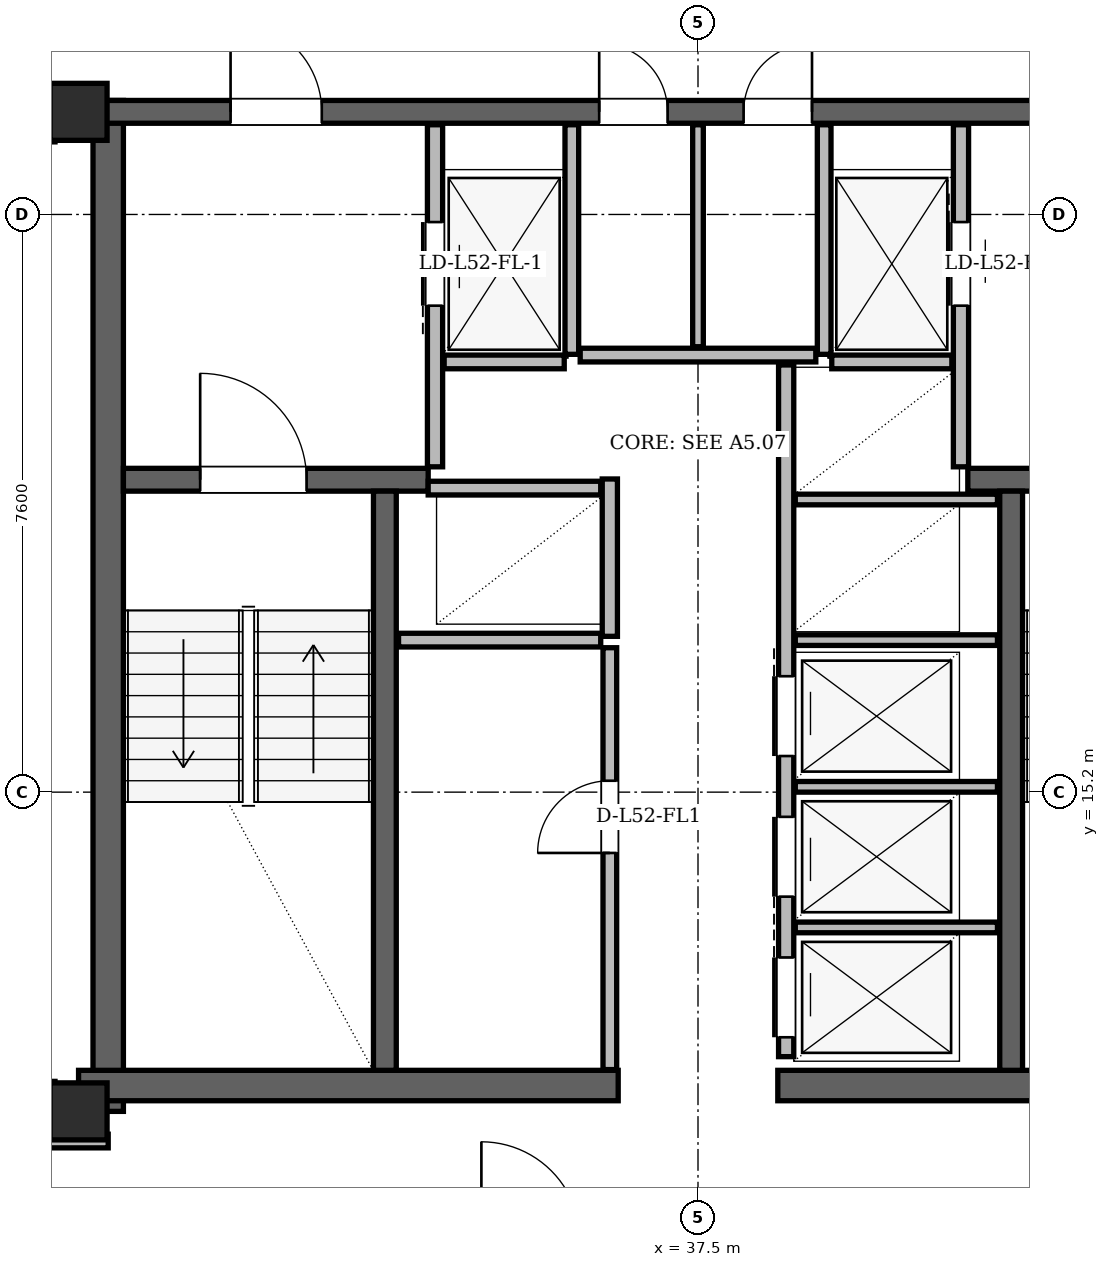
"""IFC4 building model, lengths in metres.
Left out: names, types, materials, properties, quantities, classifications, styles, units other than length and angle.
Written with IfcOpenShell. Run it as: python <this file> out.ifc"""

import sys

from ifc_helpers import new_model, si_unit, direction, frame, frame_2d, origin, origin_2d, place, context, subcontext, project, spatial, rectangle, hollow_rectangle, extrude, element, fill, save


model = new_model("IFC4")
c1 = context("Model", 3, precision=1e-05, world=origin(), true_north=direction((0.0, 1.0)))
c2 = subcontext(c1, "Body", "Model", "MODEL_VIEW")
j1 = project(units=[si_unit("LENGTHUNIT", "METRE"), si_unit("PLANEANGLEUNIT", "RADIAN")], contexts=[c1])
p1 = place(None, origin())
s1 = spatial("IfcSite", under=j1, at=p1, CompositionType="ELEMENT")
p2 = place(p1, origin())
s2 = spatial("IfcBuilding", under=s1, at=p2, CompositionType="ELEMENT")
p3 = place(p2, frame((0.0, 0.0, 197.4)))
s3 = spatial("IfcBuildingStorey", under=s2, at=p3, CompositionType="ELEMENT", Elevation=197.4)
for number, where, z_axis, x_axis in (
    (1, (29.35, 11.0, 0.0), (0.0, 0.0, 1.0), (1.0, 0.0, 0.0)),
    (2, (29.35, 24.15, 0.0), (0.0, 0.0, 1.0), (1.0, 0.0, 0.0)),
):
    element("IfcColumn", number, at=place(p3, frame(where, z_axis=z_axis, x_axis=x_axis)), inside=s3, PredefinedType="COLUMN", context=c2, shape_type="SweptSolid", body=[
        extrude(hollow_rectangle(XDim=0.75, YDim=0.75, WallThickness=0.06, at=origin_2d()), origin(), (0.0, 0.0, 1.0), 3.6),
    ])
p4 = place(p3, frame((29.74, 11.0, 0.0), z_axis=(0.0, 0.0, 1.0), x_axis=(0.0, 1.0, 0.0)))
e3 = element("IfcWall", 3, at=p4, inside=s3, PredefinedType="SHEAR", context=c2, shape_type="SweptSolid", body=[
    extrude(rectangle(XDim=13.3, YDim=0.4, at=frame_2d((6.65, 0.0))), origin(), (0.0, 0.0, 1.0), 3.38),
])
for number, where, z_axis, x_axis in (
    (4, (29.35, 11.34, 0.0), (0.0, 0.0, 1.0), (1.0, 0.0, 0.0)),
    (5, (38.55, 11.34, 0.0), (0.0, 0.0, 1.0), (1.0, 0.0, 0.0)),
):
    element("IfcWall", number, at=place(p3, frame(where, z_axis=z_axis, x_axis=x_axis)), inside=s3, PredefinedType="SHEAR", context=c2, shape_type="SweptSolid", body=[
        extrude(rectangle(XDim=7.1, YDim=0.4, at=frame_2d((3.55, 0.0))), origin(), (0.0, 0.0, 1.0), 3.38),
    ])
p5 = place(p3, frame((29.65, 24.15, 0.0), z_axis=(0.0, 0.0, 1.0), x_axis=(1.0, 0.0, 0.0)))
e6 = element("IfcWall", 6, at=p5, inside=s3, PredefinedType="SHEAR", context=c2, shape_type="SweptSolid", body=[
    extrude(rectangle(XDim=15.7, YDim=0.3, at=frame_2d((7.85, 0.0))), origin(), (0.0, 0.0, 1.0), 3.38),
])
p6 = place(p5, frame((1.7, 0.0, 0.0)))
e7 = element("IfcOpeningElement", 7, at=p6, cuts=e6, PredefinedType="OPENING", context=c2, shape_type="SweptSolid", body=[
    extrude(rectangle(XDim=1.2, YDim=2.2, at=frame_2d((0.6, 1.1))), frame((0.0, 0.15, 0.0), z_axis=(0.0, -1.0, 0.0), x_axis=(1.0, 0.0, 0.0)), (0.0, 0.0, 1.0), 0.3),
])
p7 = place(p5, frame((12.8, 0.0, 0.0)))
e8 = element("IfcOpeningElement", 8, at=p7, cuts=e6, PredefinedType="OPENING", context=c2, shape_type="SweptSolid", body=[
    extrude(rectangle(XDim=1.2, YDim=2.2, at=frame_2d((0.6, 1.1))), frame((0.0, 0.15, 0.0), z_axis=(0.0, -1.0, 0.0), x_axis=(1.0, 0.0, 0.0)), (0.0, 0.0, 1.0), 0.3),
])
p8 = place(p5, frame((6.55, 0.0, 0.0)))
e9 = element("IfcOpeningElement", 9, at=p8, cuts=e6, PredefinedType="OPENING", context=c2, shape_type="SweptSolid", body=[
    extrude(rectangle(XDim=0.9, YDim=2.05, at=frame_2d((0.45, 1.025))), frame((0.0, 0.15, 0.0), z_axis=(0.0, -1.0, 0.0), x_axis=(1.0, 0.0, 0.0)), (0.0, 0.0, 1.0), 0.3),
])
p9 = place(p5, frame((8.45, 0.0, 0.0)))
e10 = element("IfcOpeningElement", 10, at=p9, cuts=e6, PredefinedType="OPENING", context=c2, shape_type="SweptSolid", body=[
    extrude(rectangle(XDim=0.9, YDim=2.05, at=frame_2d((0.45, 1.025))), frame((0.0, 0.15, 0.0), z_axis=(0.0, -1.0, 0.0), x_axis=(1.0, 0.0, 0.0)), (0.0, 0.0, 1.0), 0.3),
])
p10 = place(p3, frame((29.94, 19.31, 0.0), z_axis=(0.0, 0.0, 1.0), x_axis=(1.0, 0.0, 0.0)))
e11 = element("IfcWall", 11, at=p10, inside=s3, PredefinedType="SHEAR", context=c2, shape_type="SweptSolid", body=[
    extrude(rectangle(XDim=4.01, YDim=0.3, at=frame_2d((2.005, 0.0))), origin(), (0.0, 0.0, 1.0), 3.38),
])
p11 = place(p10, frame((1.01, 0.0, 0.0)))
e12 = element("IfcOpeningElement", 12, at=p11, cuts=e11, PredefinedType="OPENING", context=c2, shape_type="SweptSolid", body=[
    extrude(rectangle(XDim=1.4, YDim=2.2, at=frame_2d((0.7, 1.1))), frame((0.0, 0.15, 0.0), z_axis=(0.0, -1.0, 0.0), x_axis=(1.0, 0.0, 0.0)), (0.0, 0.0, 1.0), 0.3),
])
p12 = place(p3, frame((41.05, 19.31, 0.0), z_axis=(0.0, 0.0, 1.0), x_axis=(1.0, 0.0, 0.0)))
e13 = element("IfcWall", 13, at=p12, inside=s3, PredefinedType="SHEAR", context=c2, shape_type="SweptSolid", body=[
    extrude(rectangle(XDim=4.01, YDim=0.3, at=frame_2d((2.005, 0.0))), origin(), (0.0, 0.0, 1.0), 3.38),
])
p13 = place(p12, frame((1.6, 0.0, 0.0)))
e14 = element("IfcOpeningElement", 14, at=p13, cuts=e13, PredefinedType="OPENING", context=c2, shape_type="SweptSolid", body=[
    extrude(rectangle(XDim=1.4, YDim=2.2, at=frame_2d((0.7, 1.1))), frame((0.0, 0.15, 0.0), z_axis=(0.0, -1.0, 0.0), x_axis=(1.0, 0.0, 0.0)), (0.0, 0.0, 1.0), 0.3),
])
for number, where, z_axis, x_axis in (
    (15, (33.38, 11.54, 0.0), (0.0, 0.0, 1.0), (0.0, 1.0, 0.0)),
    (16, (41.62, 11.54, 0.0), (0.0, 0.0, 1.0), (0.0, 1.0, 0.0)),
):
    element("IfcWall", number, at=place(p3, frame(where, z_axis=z_axis, x_axis=x_axis)), inside=s3, PredefinedType="SHEAR", context=c2, shape_type="SweptSolid", body=[
        extrude(rectangle(XDim=7.62, YDim=0.3, at=frame_2d((3.81, 0.0))), origin(), (0.0, 0.0, 1.0), 3.38),
    ])
p14 = place(p3, frame((33.766, 43.21, 0.0), z_axis=(0.0, 0.0, 1.0), x_axis=(-0.499998847915, -0.86602606894, 0.0)))
e17 = element("IfcWall", 17, at=p14, inside=s3, PredefinedType="SOLIDWALL", context=c2, shape_type="SweptSolid", body=[
    extrude(rectangle(XDim=36.293, YDim=0.29, at=frame_2d((18.147, 0.0))), origin(), (0.0, 0.0, 1.0), 2.677),
])
p15 = place(p14, frame((8.034, 0.0, 0.0)))
e18 = element("IfcOpeningElement", 18, at=p15, cuts=e17, PredefinedType="OPENING", context=c2, shape_type="SweptSolid", body=[
    extrude(rectangle(XDim=1.5, YDim=2.2, at=frame_2d((0.75, 1.1))), frame((0.0, 0.145, 0.0), z_axis=(0.0, -1.0, 0.0), x_axis=(1.0, 0.0, 0.0)), (0.0, 0.0, 1.0), 0.29),
])
p16 = place(p14, frame((28.214, 0.0, 0.0)))
e19 = element("IfcOpeningElement", 19, at=p16, cuts=e17, PredefinedType="OPENING", context=c2, shape_type="SweptSolid", body=[
    extrude(rectangle(XDim=1.5, YDim=2.2, at=frame_2d((0.75, 1.1))), frame((0.0, 0.145, 0.0), z_axis=(0.0, -1.0, 0.0), x_axis=(1.0, 0.0, 0.0)), (0.0, 0.0, 1.0), 0.29),
])
p17 = place(p14, frame((32.772, 0.0, 0.85)))
e20 = element("IfcOpeningElement", 20, at=p17, cuts=e17, PredefinedType="OPENING", context=c2, shape_type="SweptSolid", body=[
    extrude(rectangle(XDim=2.4, YDim=1.717, at=frame_2d((1.2, 0.858))), frame((0.0, 0.145, 0.0), z_axis=(0.0, -1.0, 0.0), x_axis=(1.0, 0.0, 0.0)), (0.0, 0.0, 1.0), 0.29),
])
p18 = place(p14, frame((21.96, 0.0, 0.85)))
e21 = element("IfcOpeningElement", 21, at=p18, cuts=e17, PredefinedType="OPENING", context=c2, shape_type="SweptSolid", body=[
    extrude(rectangle(XDim=2.0, YDim=1.717, at=frame_2d((1.0, 0.858))), frame((0.0, 0.145, 0.0), z_axis=(0.0, -1.0, 0.0), x_axis=(1.0, 0.0, 0.0)), (0.0, 0.0, 1.0), 0.29),
])
p19 = place(p14, frame((2.382, 0.0, 0.85)))
e22 = element("IfcOpeningElement", 22, at=p19, cuts=e17, PredefinedType="OPENING", context=c2, shape_type="SweptSolid", body=[
    extrude(rectangle(XDim=1.6, YDim=1.7, at=frame_2d((0.8, 0.85))), frame((0.0, 0.145, 0.0), z_axis=(0.0, -1.0, 0.0), x_axis=(1.0, 0.0, 0.0)), (0.0, 0.0, 1.0), 0.29),
])
p20 = place(p14, frame((13.34, 0.0, 0.85)))
e23 = element("IfcOpeningElement", 23, at=p20, cuts=e17, PredefinedType="OPENING", context=c2, shape_type="SweptSolid", body=[
    extrude(rectangle(XDim=3.0, YDim=1.717, at=frame_2d((1.5, 0.858))), frame((0.0, 0.145, 0.0), z_axis=(0.0, -1.0, 0.0), x_axis=(1.0, 0.0, 0.0)), (0.0, 0.0, 1.0), 0.29),
])
p21 = place(p3, frame((34.04, 19.48, 0.0), z_axis=(0.0, 0.0, 1.0), x_axis=(0.0, 1.0, 0.0)))
e24 = element("IfcWall", 24, at=p21, inside=s3, PredefinedType="PARTITIONING", context=c2, shape_type="SweptSolid", body=[
    extrude(rectangle(XDim=4.5, YDim=0.2, at=frame_2d((2.25, 0.0))), origin(), (0.0, 0.0, 1.0), 3.38),
])
p22 = place(p21, frame((2.12, 0.0, 0.0)))
e25 = element("IfcOpeningElement", 25, at=p22, cuts=e24, PredefinedType="OPENING", context=c2, shape_type="SweptSolid", body=[
    extrude(rectangle(XDim=1.1, YDim=2.2, at=frame_2d((0.55, 1.1))), frame((0.0, 0.1, 0.0), z_axis=(0.0, -1.0, 0.0), x_axis=(1.0, 0.0, 0.0)), (0.0, 0.0, 1.0), 0.2),
])
p23 = place(p3, frame((35.84, 20.96, 0.0), z_axis=(0.0, 0.0, 1.0), x_axis=(0.0, 1.0, 0.0)))
e26 = element("IfcWall", 26, at=p23, inside=s3, PredefinedType="PARTITIONING", context=c2, shape_type="SweptSolid", body=[
    extrude(rectangle(XDim=3.02, YDim=0.18, at=frame_2d((1.51, 0.0))), origin(), (0.0, 0.0, 1.0), 3.38),
])
p24 = place(p3, frame((34.16, 20.86, 0.0), z_axis=(0.0, 0.0, 1.0), x_axis=(1.0, 0.0, 0.0)))
e27 = element("IfcWall", 27, at=p24, inside=s3, PredefinedType="PARTITIONING", context=c2, shape_type="SweptSolid", body=[
    extrude(rectangle(XDim=1.58, YDim=0.18, at=frame_2d((0.79, 0.0))), origin(), (0.0, 0.0, 1.0), 3.38),
])
p25 = place(p3, frame((40.96, 19.48, 0.0), z_axis=(0.0, 0.0, 1.0), x_axis=(0.0, 1.0, 0.0)))
e28 = element("IfcWall", 28, at=p25, inside=s3, PredefinedType="PARTITIONING", context=c2, shape_type="SweptSolid", body=[
    extrude(rectangle(XDim=4.5, YDim=0.2, at=frame_2d((2.25, 0.0))), origin(), (0.0, 0.0, 1.0), 3.38),
])
p26 = place(p25, frame((2.12, 0.0, 0.0)))
e29 = element("IfcOpeningElement", 29, at=p26, cuts=e28, PredefinedType="OPENING", context=c2, shape_type="SweptSolid", body=[
    extrude(rectangle(XDim=1.1, YDim=2.2, at=frame_2d((0.55, 1.1))), frame((0.0, 0.1, 0.0), z_axis=(0.0, -1.0, 0.0), x_axis=(1.0, 0.0, 0.0)), (0.0, 0.0, 1.0), 0.2),
])
p27 = place(p3, frame((39.16, 20.96, 0.0), z_axis=(0.0, 0.0, 1.0), x_axis=(0.0, 1.0, 0.0)))
e30 = element("IfcWall", 30, at=p27, inside=s3, PredefinedType="PARTITIONING", context=c2, shape_type="SweptSolid", body=[
    extrude(rectangle(XDim=3.02, YDim=0.18, at=frame_2d((1.51, 0.0))), origin(), (0.0, 0.0, 1.0), 3.38),
])
p28 = place(p3, frame((39.26, 20.86, 0.0), z_axis=(0.0, 0.0, 1.0), x_axis=(1.0, 0.0, 0.0)))
e31 = element("IfcWall", 31, at=p28, inside=s3, PredefinedType="PARTITIONING", context=c2, shape_type="SweptSolid", body=[
    extrude(rectangle(XDim=1.58, YDim=0.18, at=frame_2d((0.79, 0.0))), origin(), (0.0, 0.0, 1.0), 3.38),
])
p29 = place(p3, frame((36.34, 17.25, 0.0), z_axis=(0.0, 0.0, 1.0), x_axis=(0.0, 1.0, 0.0)))
e32 = element("IfcWall", 32, at=p29, inside=s3, PredefinedType="PARTITIONING", context=c2, shape_type="SweptSolid", body=[
    extrude(rectangle(XDim=2.07, YDim=0.2, at=frame_2d((1.035, 0.0))), origin(), (0.0, 0.0, 1.0), 3.38),
])
p30 = place(p3, frame((33.95, 19.2, 0.0), z_axis=(0.0, 0.0, 1.0), x_axis=(1.0, 0.0, 0.0)))
e33 = element("IfcWall", 33, at=p30, inside=s3, PredefinedType="PARTITIONING", context=c2, shape_type="SweptSolid", body=[
    extrude(rectangle(XDim=2.27, YDim=0.18, at=frame_2d((1.135, 0.0))), origin(), (0.0, 0.0, 1.0), 3.38),
])
p31 = place(p3, frame((33.56, 17.2, 0.0), z_axis=(0.0, 0.0, 1.0), x_axis=(1.0, 0.0, 0.0)))
e34 = element("IfcWall", 34, at=p31, inside=s3, PredefinedType="PARTITIONING", context=c2, shape_type="SweptSolid", body=[
    extrude(rectangle(XDim=2.66, YDim=0.18, at=frame_2d((1.33, 0.0))), origin(), (0.0, 0.0, 1.0), 3.38),
])
p32 = place(p3, frame((36.34, 11.55, 0.0), z_axis=(0.0, 0.0, 1.0), x_axis=(0.0, 1.0, 0.0)))
e35 = element("IfcWall", 35, at=p32, inside=s3, PredefinedType="PARTITIONING", context=c2, shape_type="SweptSolid", body=[
    extrude(rectangle(XDim=5.55, YDim=0.18, at=frame_2d((2.775, 0.0))), origin(), (0.0, 0.0, 1.0), 3.38),
])
p33 = place(p32, frame((2.85, 0.0, 0.0)))
e36 = element("IfcOpeningElement", 36, at=p33, cuts=e35, PredefinedType="OPENING", context=c2, shape_type="SweptSolid", body=[
    extrude(rectangle(XDim=0.95, YDim=2.1, at=frame_2d((0.475, 1.05))), frame((0.0, 0.09, 0.0), z_axis=(0.0, -1.0, 0.0), x_axis=(1.0, 0.0, 0.0)), (0.0, 0.0, 1.0), 0.18),
])
p34 = place(p3, frame((38.66, 11.72, 0.0), z_axis=(0.0, 0.0, 1.0), x_axis=(0.0, 1.0, 0.0)))
e37 = element("IfcWall", 37, at=p34, inside=s3, PredefinedType="PARTITIONING", context=c2, shape_type="SweptSolid", body=[
    extrude(rectangle(XDim=9.1, YDim=0.2, at=frame_2d((4.55, 0.0))), origin(), (0.0, 0.0, 1.0), 3.38),
])
p35 = place(p34, frame((0.255, 0.0, 0.0)))
e38 = element("IfcOpeningElement", 38, at=p35, cuts=e37, PredefinedType="OPENING", context=c2, shape_type="SweptSolid", body=[
    extrude(rectangle(XDim=1.05, YDim=2.15, at=frame_2d((0.525, 1.075))), frame((0.0, 0.1, 0.0), z_axis=(0.0, -1.0, 0.0), x_axis=(1.0, 0.0, 0.0)), (0.0, 0.0, 1.0), 0.2),
])
p36 = place(p34, frame((2.105, 0.0, 0.0)))
e39 = element("IfcOpeningElement", 39, at=p36, cuts=e37, PredefinedType="OPENING", context=c2, shape_type="SweptSolid", body=[
    extrude(rectangle(XDim=1.05, YDim=2.15, at=frame_2d((0.525, 1.075))), frame((0.0, 0.1, 0.0), z_axis=(0.0, -1.0, 0.0), x_axis=(1.0, 0.0, 0.0)), (0.0, 0.0, 1.0), 0.2),
])
p37 = place(p34, frame((3.955, 0.0, 0.0)))
e40 = element("IfcOpeningElement", 40, at=p37, cuts=e37, PredefinedType="OPENING", context=c2, shape_type="SweptSolid", body=[
    extrude(rectangle(XDim=1.05, YDim=2.15, at=frame_2d((0.525, 1.075))), frame((0.0, 0.1, 0.0), z_axis=(0.0, -1.0, 0.0), x_axis=(1.0, 0.0, 0.0)), (0.0, 0.0, 1.0), 0.2),
])
for number, where, z_axis, x_axis in (
    (41, (38.78, 13.42, 0.0), (0.0, 0.0, 1.0), (1.0, 0.0, 0.0)),
    (42, (38.78, 15.27, 0.0), (0.0, 0.0, 1.0), (1.0, 0.0, 0.0)),
    (43, (38.78, 17.2, 0.0), (0.0, 0.0, 1.0), (1.0, 0.0, 0.0)),
    (44, (38.78, 19.05, 0.0), (0.0, 0.0, 1.0), (1.0, 0.0, 0.0)),
):
    element("IfcWall", number, at=place(p3, frame(where, z_axis=z_axis, x_axis=x_axis)), inside=s3, PredefinedType="PARTITIONING", context=c2, shape_type="SweptSolid", body=[
        extrude(rectangle(XDim=2.66, YDim=0.14, at=frame_2d((1.33, 0.0))), origin(), (0.0, 0.0, 1.0), 3.38),
    ])
p38 = place(p3, frame((35.95, 20.95, 0.0), z_axis=(0.0, 0.0, 1.0), x_axis=(1.0, 0.0, 0.0)))
e45 = element("IfcWall", 45, at=p38, inside=s3, PredefinedType="PARTITIONING", context=c2, shape_type="SweptSolid", body=[
    extrude(rectangle(XDim=3.1, YDim=0.18, at=frame_2d((1.55, 0.0))), origin(), (0.0, 0.0, 1.0), 3.38),
])
p39 = place(p3, frame((37.5, 21.06, 0.0), z_axis=(0.0, 0.0, 1.0), x_axis=(0.0, 1.0, 0.0)))
e46 = element("IfcWall", 46, at=p39, inside=s3, PredefinedType="PARTITIONING", context=c2, shape_type="SweptSolid", body=[
    extrude(rectangle(XDim=2.92, YDim=0.14, at=frame_2d((1.46, 0.0))), origin(), (0.0, 0.0, 1.0), 3.38),
])
p40 = place(p3, frame((28.96, 10.61, 0.0), z_axis=(0.0, 0.0, 1.0), x_axis=(1.0, 0.0, 0.0)))
e47 = element("IfcWall", 47, at=p40, inside=s3, PredefinedType="PARTITIONING", context=c2, shape_type="SweptSolid", body=[
    extrude(rectangle(XDim=0.78, YDim=0.18, at=frame_2d((0.39, 0.0))), origin(), (0.0, 0.0, 1.0), 3.38),
])
p41 = place(p3, frame((28.95, 10.95, 0.0), z_axis=(0.0, 0.0, 1.0), x_axis=(0.0, 1.0, 0.0)))
e48 = element("IfcWall", 48, at=p41, inside=s3, PredefinedType="PARTITIONING", context=c2, shape_type="SweptSolid", body=[
    extrude(rectangle(XDim=0.445, YDim=0.18, at=frame_2d((0.223, 0.0))), origin(), (0.0, 0.0, 1.0), 2.913),
])
p42 = place(p3, frame((28.95, 23.755, 0.0), z_axis=(0.0, 0.0, 1.0), x_axis=(0.0, 1.0, 0.0)))
e49 = element("IfcWall", 49, at=p42, inside=s3, PredefinedType="PARTITIONING", context=c2, shape_type="SweptSolid", body=[
    extrude(rectangle(XDim=0.565, YDim=0.18, at=frame_2d((0.283, 0.0))), origin(), (0.0, 0.0, 1.0), 3.38),
])
p43 = place(p33, origin())
e50 = element("IfcDoor", 50, at=p43, inside=s3, OperationType="SINGLE_SWING_LEFT", PredefinedType="DOOR", context=c2, shape_type="SweptSolid", body=[
    extrude(rectangle(XDim=0.95, YDim=2.1, at=frame_2d((0.475, 1.05))), frame((0.0, 0.025, 0.0), z_axis=(0.0, -1.0, 0.0), x_axis=(1.0, 0.0, 0.0)), (0.0, 0.0, 1.0), 0.05),
])
fill(e36, e50)
p44 = place(p22, origin())
e51 = element("IfcDoor", 51, at=p44, inside=s3, OperationType="SLIDING_TO_LEFT", PredefinedType="DOOR", context=c2, shape_type="SweptSolid", body=[
    extrude(rectangle(XDim=1.1, YDim=2.2, at=frame_2d((0.55, 1.1))), frame((0.0, 0.025, 0.0), z_axis=(0.0, -1.0, 0.0), x_axis=(1.0, 0.0, 0.0)), (0.0, 0.0, 1.0), 0.05),
])
fill(e25, e51)
p45 = place(p26, origin())
e52 = element("IfcDoor", 52, at=p45, inside=s3, OperationType="SLIDING_TO_RIGHT", PredefinedType="DOOR", context=c2, shape_type="SweptSolid", body=[
    extrude(rectangle(XDim=1.1, YDim=2.2, at=frame_2d((0.55, 1.1))), frame((0.0, 0.025, 0.0), z_axis=(0.0, -1.0, 0.0), x_axis=(1.0, 0.0, 0.0)), (0.0, 0.0, 1.0), 0.05),
])
fill(e29, e52)
p46 = place(p35, origin())
e53 = element("IfcDoor", 53, at=p46, inside=s3, OperationType="SLIDING_TO_RIGHT", PredefinedType="DOOR", context=c2, shape_type="SweptSolid", body=[
    extrude(rectangle(XDim=1.05, YDim=2.15, at=frame_2d((0.525, 1.075))), frame((0.0, 0.025, 0.0), z_axis=(0.0, -1.0, 0.0), x_axis=(1.0, 0.0, 0.0)), (0.0, 0.0, 1.0), 0.05),
])
fill(e38, e53)
p47 = place(p36, origin())
e54 = element("IfcDoor", 54, at=p47, inside=s3, OperationType="SLIDING_TO_LEFT", PredefinedType="DOOR", context=c2, shape_type="SweptSolid", body=[
    extrude(rectangle(XDim=1.05, YDim=2.15, at=frame_2d((0.525, 1.075))), frame((0.0, 0.025, 0.0), z_axis=(0.0, -1.0, 0.0), x_axis=(1.0, 0.0, 0.0)), (0.0, 0.0, 1.0), 0.05),
])
fill(e39, e54)
p48 = place(p37, origin())
e55 = element("IfcDoor", 55, at=p48, inside=s3, OperationType="SLIDING_TO_RIGHT", PredefinedType="DOOR", context=c2, shape_type="SweptSolid", body=[
    extrude(rectangle(XDim=1.05, YDim=2.15, at=frame_2d((0.525, 1.075))), frame((0.0, 0.025, 0.0), z_axis=(0.0, -1.0, 0.0), x_axis=(1.0, 0.0, 0.0)), (0.0, 0.0, 1.0), 0.05),
])
fill(e40, e55)
p49 = place(p11, origin())
e56 = element("IfcDoor", 56, at=p49, inside=s3, OperationType="SINGLE_SWING_LEFT", PredefinedType="DOOR", context=c2, shape_type="SweptSolid", body=[
    extrude(rectangle(XDim=1.4, YDim=2.2, at=frame_2d((0.7, 1.1))), frame((0.0, 0.025, 0.0), z_axis=(0.0, -1.0, 0.0), x_axis=(1.0, 0.0, 0.0)), (0.0, 0.0, 1.0), 0.05),
])
fill(e12, e56)
p50 = place(p6, origin())
e57 = element("IfcDoor", 57, at=p50, inside=s3, OperationType="SINGLE_SWING_LEFT", PredefinedType="DOOR", context=c2, shape_type="SweptSolid", body=[
    extrude(rectangle(XDim=1.2, YDim=2.2, at=frame_2d((0.6, 1.1))), frame((0.0, 0.025, 0.0), z_axis=(0.0, -1.0, 0.0), x_axis=(1.0, 0.0, 0.0)), (0.0, 0.0, 1.0), 0.05),
])
fill(e7, e57)
p51 = place(p8, origin())
e58 = element("IfcDoor", 58, at=p51, inside=s3, OperationType="SINGLE_SWING_LEFT", PredefinedType="DOOR", context=c2, shape_type="SweptSolid", body=[
    extrude(rectangle(XDim=0.9, YDim=2.05, at=frame_2d((0.45, 1.025))), frame((0.0, 0.025, 0.0), z_axis=(0.0, -1.0, 0.0), x_axis=(1.0, 0.0, 0.0)), (0.0, 0.0, 1.0), 0.05),
])
fill(e9, e58)
p52 = place(p9, origin())
e59 = element("IfcDoor", 59, at=p52, inside=s3, OperationType="SINGLE_SWING_RIGHT", PredefinedType="DOOR", context=c2, shape_type="SweptSolid", body=[
    extrude(rectangle(XDim=0.9, YDim=2.05, at=frame_2d((0.45, 1.025))), frame((0.0, 0.025, 0.0), z_axis=(0.0, -1.0, 0.0), x_axis=(1.0, 0.0, 0.0)), (0.0, 0.0, 1.0), 0.05),
])
fill(e10, e59)
save(model, sys.argv[1])
